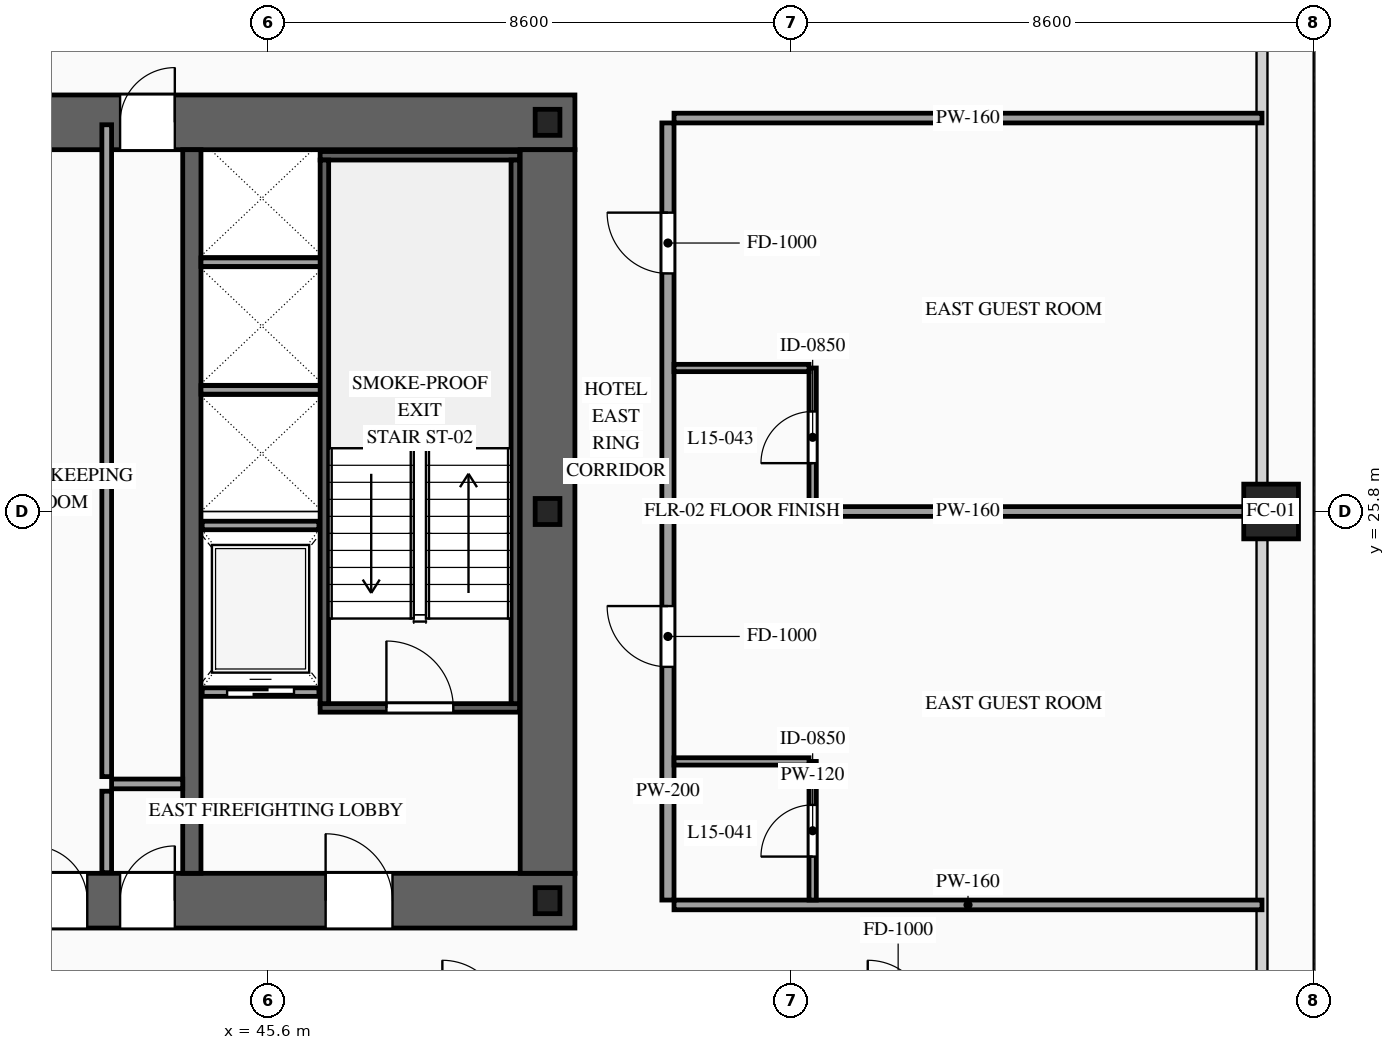
"""IFC4 building model, lengths in metres.
Left out: names, types, materials, properties, quantities, classifications, styles, units other than length and angle.
Written with IfcOpenShell. Run it as: python <this file> out.ifc"""

import sys

from ifc_helpers import new_model, si_unit, direction, frame, frame_2d, origin, origin_2d, place, context, subcontext, project, spatial, rectangle, hollow_rectangle, i_section, extrude, source, transform, mapped, element, fill, save


model = new_model("IFC4")
c1 = context("Model", 3, precision=1e-05, world=origin(), true_north=direction((0.0, 1.0)))
c2 = subcontext(c1, "Body", "Model", "MODEL_VIEW")
j1 = project(units=[si_unit("LENGTHUNIT", "METRE"), si_unit("PLANEANGLEUNIT", "RADIAN")], contexts=[c1])
p1 = place(None, origin())
s1 = spatial("IfcSite", under=j1, at=p1, CompositionType="ELEMENT")
p2 = place(p1, origin())
s2 = spatial("IfcBuilding", under=s1, at=p2, CompositionType="ELEMENT")
p3 = place(p2, frame((0.0, 0.0, 60.4)))
s3 = spatial("IfcBuildingStorey", under=s2, at=p3, CompositionType="ELEMENT", Elevation=60.4)
p4 = place(p3, frame((23.35, 19.4, 0.0), z_axis=(0.0, 0.0, 1.0), x_axis=(1.0, 0.0, 0.0)))
e1 = element("IfcWall", 1, at=p4, inside=s3, PredefinedType="SHEAR", context=c2, shape_type="SweptSolid", body=[
    extrude(rectangle(XDim=27.3, YDim=0.9, at=frame_2d((13.65, 0.0))), origin(), (0.0, 0.0, 1.0), 3.6),
])
p5 = place(p4, frame((2.1, 0.0, 0.0)))
e2 = element("IfcOpeningElement", 2, at=p5, cuts=e1, PredefinedType="OPENING", context=c2, shape_type="SweptSolid", body=[
    extrude(rectangle(XDim=1.1, YDim=2.2, at=frame_2d((0.55, 1.1))), frame((0.0, 0.465, 0.0), z_axis=(0.0, -1.0, 0.0), x_axis=(1.0, 0.0, 0.0)), (0.0, 0.0, 1.0), 0.93),
])
p6 = place(p4, frame((10.0, 0.0, 0.0)))
e3 = element("IfcOpeningElement", 3, at=p6, cuts=e1, PredefinedType="OPENING", context=c2, shape_type="SweptSolid", body=[
    extrude(rectangle(XDim=1.1, YDim=2.2, at=frame_2d((0.55, 1.1))), frame((0.0, 0.465, 0.0), z_axis=(0.0, -1.0, 0.0), x_axis=(1.0, 0.0, 0.0)), (0.0, 0.0, 1.0), 0.93),
])
p7 = place(p4, frame((23.2, 0.0, 0.0)))
e4 = element("IfcOpeningElement", 4, at=p7, cuts=e1, PredefinedType="OPENING", context=c2, shape_type="SweptSolid", body=[
    extrude(rectangle(XDim=1.1, YDim=2.2, at=frame_2d((0.55, 1.1))), frame((0.0, 0.465, 0.0), z_axis=(0.0, -1.0, 0.0), x_axis=(1.0, 0.0, 0.0)), (0.0, 0.0, 1.0), 0.93),
])
p8 = place(p4, frame((19.82, 0.0, 0.0)))
e5 = element("IfcOpeningElement", 5, at=p8, cuts=e1, PredefinedType="OPENING", context=c2, shape_type="SweptSolid", body=[
    extrude(rectangle(XDim=0.9, YDim=2.15, at=frame_2d((0.45, 1.075))), frame((0.0, 0.465, 0.0), z_axis=(0.0, -1.0, 0.0), x_axis=(1.0, 0.0, 0.0)), (0.0, 0.0, 1.0), 0.93),
])
p9 = place(p4, frame((18.38, 0.0, 0.0)))
e6 = element("IfcOpeningElement", 6, at=p9, cuts=e1, PredefinedType="OPENING", context=c2, shape_type="SweptSolid", body=[
    extrude(rectangle(XDim=0.9, YDim=2.15, at=frame_2d((0.45, 1.075))), frame((0.0, 0.465, 0.0), z_axis=(0.0, -1.0, 0.0), x_axis=(1.0, 0.0, 0.0)), (0.0, 0.0, 1.0), 0.93),
])
p10 = place(p3, frame((23.35, 32.2, 0.0), z_axis=(0.0, 0.0, 1.0), x_axis=(1.0, 0.0, 0.0)))
e7 = element("IfcWall", 7, at=p10, inside=s3, PredefinedType="SHEAR", context=c2, shape_type="SweptSolid", body=[
    extrude(rectangle(XDim=27.3, YDim=0.9, at=frame_2d((13.65, 0.0))), origin(), (0.0, 0.0, 1.0), 3.6),
])
p11 = place(p10, frame((4.72, 0.0, 0.0)))
e8 = element("IfcOpeningElement", 8, at=p11, cuts=e7, PredefinedType="OPENING", context=c2, shape_type="SweptSolid", body=[
    extrude(rectangle(XDim=0.9, YDim=2.15, at=frame_2d((0.45, 1.075))), frame((0.0, 0.465, 0.0), z_axis=(0.0, -1.0, 0.0), x_axis=(1.0, 0.0, 0.0)), (0.0, 0.0, 1.0), 0.93),
])
p12 = place(p10, frame((10.0, 0.0, 0.0)))
e9 = element("IfcOpeningElement", 9, at=p12, cuts=e7, PredefinedType="OPENING", context=c2, shape_type="SweptSolid", body=[
    extrude(rectangle(XDim=1.1, YDim=2.2, at=frame_2d((0.55, 1.1))), frame((0.0, 0.465, 0.0), z_axis=(0.0, -1.0, 0.0), x_axis=(1.0, 0.0, 0.0)), (0.0, 0.0, 1.0), 0.93),
])
p13 = place(p10, frame((15.85, 0.0, 0.0)))
e10 = element("IfcOpeningElement", 10, at=p13, cuts=e7, PredefinedType="OPENING", context=c2, shape_type="SweptSolid", body=[
    extrude(rectangle(XDim=1.1, YDim=2.2, at=frame_2d((0.55, 1.1))), frame((0.0, 0.465, 0.0), z_axis=(0.0, -1.0, 0.0), x_axis=(1.0, 0.0, 0.0)), (0.0, 0.0, 1.0), 0.93),
])
p14 = place(p10, frame((19.82, 0.0, 0.0)))
e11 = element("IfcOpeningElement", 11, at=p14, cuts=e7, PredefinedType="OPENING", context=c2, shape_type="SweptSolid", body=[
    extrude(rectangle(XDim=0.9, YDim=2.15, at=frame_2d((0.45, 1.075))), frame((0.0, 0.465, 0.0), z_axis=(0.0, -1.0, 0.0), x_axis=(1.0, 0.0, 0.0)), (0.0, 0.0, 1.0), 0.93),
])
m1 = source(origin(), c2, "Body", "SweptSolid", [
    extrude(rectangle(XDim=11.9, YDim=0.9, at=frame_2d((5.95, 0.0))), origin(), (0.0, 0.0, 1.0), 3.6),
])
p15 = place(p3, frame((50.2, 19.85, 0.0), z_axis=(0.0, 0.0, 1.0), x_axis=(0.0, 1.0, 0.0)))
e12 = element("IfcWall", 12, at=p15, inside=s3, PredefinedType="SHEAR", context=c2, shape_type="MappedRepresentation", body=[
    mapped(m1, transform((0.0, 0.0, 0.0), scale=1.0)),
])
m2 = source(origin(), c2, "Body", "SweptSolid", [
    extrude(rectangle(XDim=11.9, YDim=0.3, at=frame_2d((5.95, 0.0))), origin(), (0.0, 0.0, 1.0), 3.6),
])
p16 = place(p3, frame((44.35, 19.85, 0.0), z_axis=(0.0, 0.0, 1.0), x_axis=(0.0, 1.0, 0.0)))
e13 = element("IfcWall", 13, at=p16, inside=s3, PredefinedType="SOLIDWALL", context=c2, shape_type="MappedRepresentation", body=[
    mapped(m2, transform((0.0, 0.0, 0.0), scale=1.0)),
])
m3 = source(origin(), c2, "Body", "SweptSolid", [
    extrude(i_section(OverallWidth=0.407, OverallDepth=0.428, WebThickness=0.02, FlangeThickness=0.035, at=origin_2d()), origin(), (0.0, 0.0, 1.0), 3.6),
])
for number, where, z_axis, x_axis in (
    (14, (50.2, 19.4, 0.0), (0.0, 0.0, 1.0), (1.0, 0.0, 0.0)),
    (15, (50.2, 25.8, 0.0), (0.0, 0.0, 1.0), (1.0, 0.0, 0.0)),
    (16, (50.2, 32.2, 0.0), (0.0, 0.0, 1.0), (1.0, 0.0, 0.0)),
):
    element("IfcColumn", number, at=place(p3, frame(where, z_axis=z_axis, x_axis=x_axis)), inside=s3, PredefinedType="COLUMN", context=c2, shape_type="MappedRepresentation", body=[
        mapped(m3, transform((0.0, 0.0, 0.0), scale=1.0)),
    ])
m4 = source(origin(), c2, "Body", "SweptSolid", [
    extrude(hollow_rectangle(XDim=0.9, YDim=0.9, WallThickness=0.042, at=origin_2d()), origin(), (0.0, 0.0, 1.0), 3.6),
])
p17 = place(p3, frame((62.1, 25.8, 0.0), z_axis=(0.0, 0.0, 1.0), x_axis=(1.0, 0.0, 0.0)))
e17 = element("IfcColumn", 17, at=p17, inside=s3, PredefinedType="COLUMN", context=c2, shape_type="MappedRepresentation", body=[
    mapped(m4, transform((0.0, 0.0, 0.0), scale=1.0)),
])
p18 = place(p3, frame((44.52, 22.83, 0.0), z_axis=(0.0, 0.0, 1.0), x_axis=(1.0, 0.0, 0.0)))
e18 = element("IfcWall", 18, at=p18, inside=s3, PredefinedType="SOLIDWALL", context=c2, shape_type="SweptSolid", body=[
    extrude(rectangle(XDim=1.92, YDim=0.14, at=frame_2d((0.96, 0.0))), origin(), (0.0, 0.0, 1.0), 3.38),
])
p19 = place(p18, frame((0.41, 0.0, 0.0)))
e19 = element("IfcOpeningElement", 19, at=p19, cuts=e18, PredefinedType="OPENING", context=c2, shape_type="SweptSolid", body=[
    extrude(rectangle(XDim=1.1, YDim=2.2, at=frame_2d((0.55, 1.1))), frame((0.0, 0.085, 0.0), z_axis=(0.0, -1.0, 0.0), x_axis=(1.0, 0.0, 0.0)), (0.0, 0.0, 1.0), 0.17),
])
m5 = source(origin(), c2, "Body", "SweptSolid", [
    extrude(rectangle(XDim=1.92, YDim=0.14, at=frame_2d((0.96, 0.0))), origin(), (0.0, 0.0, 1.0), 3.38),
])
p20 = place(p3, frame((44.52, 25.57, 0.0), z_axis=(0.0, 0.0, 1.0), x_axis=(1.0, 0.0, 0.0)))
e20 = element("IfcWall", 20, at=p20, inside=s3, PredefinedType="SOLIDWALL", context=c2, shape_type="MappedRepresentation", body=[
    mapped(m5, transform((0.0, 0.0, 0.0), scale=1.0)),
])
m6 = source(origin(), c2, "Body", "SweptSolid", [
    extrude(rectangle(XDim=2.0, YDim=0.14, at=frame_2d((1.0, 0.0))), origin(), (0.0, 0.0, 1.0), 3.38),
])
for number, where, z_axis, x_axis in (
    (21, (44.5, 27.8, 0.0), (0.0, 0.0, 1.0), (1.0, 0.0, 0.0)),
    (22, (44.5, 29.9, 0.0), (0.0, 0.0, 1.0), (1.0, 0.0, 0.0)),
):
    element("IfcWall", number, at=place(p3, frame(where, z_axis=z_axis, x_axis=x_axis)), inside=s3, PredefinedType="SOLIDWALL", context=c2, shape_type="MappedRepresentation", body=[
        mapped(m6, transform((0.0, 0.0, 0.0), scale=1.0)),
    ])
p21 = place(p3, frame((46.46, 22.57, 0.0), z_axis=(0.0, 0.0, 1.0), x_axis=(1.0, 0.0, 0.0)))
e23 = element("IfcWall", 23, at=p21, inside=s3, PredefinedType="SOLIDWALL", context=c2, shape_type="SweptSolid", body=[
    extrude(rectangle(XDim=3.28, YDim=0.14, at=frame_2d((1.64, 0.0))), origin(), (0.0, 0.0, 1.0), 3.38),
])
p22 = place(p21, frame((1.09, 0.0, 0.0)))
e24 = element("IfcOpeningElement", 24, at=p22, cuts=e23, PredefinedType="OPENING", context=c2, shape_type="SweptSolid", body=[
    extrude(rectangle(XDim=1.1, YDim=2.2, at=frame_2d((0.55, 1.1))), frame((0.0, 0.085, 0.0), z_axis=(0.0, -1.0, 0.0), x_axis=(1.0, 0.0, 0.0)), (0.0, 0.0, 1.0), 0.17),
])
m7 = source(origin(), c2, "Body", "SweptSolid", [
    extrude(rectangle(XDim=3.28, YDim=0.14, at=frame_2d((1.64, 0.0))), origin(), (0.0, 0.0, 1.0), 3.38),
])
p23 = place(p3, frame((46.46, 31.65, 0.0), z_axis=(0.0, 0.0, 1.0), x_axis=(1.0, 0.0, 0.0)))
e25 = element("IfcWall", 25, at=p23, inside=s3, PredefinedType="SOLIDWALL", context=c2, shape_type="MappedRepresentation", body=[
    mapped(m7, transform((0.0, 0.0, 0.0), scale=1.0)),
])
m8 = source(origin(), c2, "Body", "SweptSolid", [
    extrude(rectangle(XDim=8.94, YDim=0.14, at=frame_2d((4.47, 0.0))), origin(), (0.0, 0.0, 1.0), 3.38),
])
for number, where, z_axis, x_axis in (
    (26, (46.53, 22.64, 0.0), (0.0, 0.0, 1.0), (0.0, 1.0, 0.0)),
    (27, (49.67, 22.64, 0.0), (0.0, 0.0, 1.0), (0.0, 1.0, 0.0)),
):
    element("IfcWall", number, at=place(p3, frame(where, z_axis=z_axis, x_axis=x_axis)), inside=s3, PredefinedType="SOLIDWALL", context=c2, shape_type="MappedRepresentation", body=[
        mapped(m8, transform((0.0, 0.0, 0.0), scale=1.0)),
    ])
m9 = source(origin(), c2, "Body", "SweptSolid", [
    extrude(rectangle(XDim=1.34, YDim=0.16, at=frame_2d((0.67, 0.0))), origin(), (0.0, 0.0, 1.0), 3.38),
])
p24 = place(p3, frame((42.95, 19.86, 0.0), z_axis=(0.0, 0.0, 1.0), x_axis=(0.0, 1.0, 0.0)))
e28 = element("IfcWall", 28, at=p24, inside=s3, PredefinedType="PARTITIONING", context=c2, shape_type="MappedRepresentation", body=[
    mapped(m9, transform((0.0, 0.0, 0.0), scale=1.0)),
])
m10 = source(origin(), c2, "Body", "SweptSolid", [
    extrude(rectangle(XDim=1.17, YDim=0.16, at=frame_2d((0.585, 0.0))), origin(), (0.0, 0.0, 1.0), 3.38),
])
p25 = place(p3, frame((43.03, 21.32, 0.0), z_axis=(0.0, 0.0, 1.0), x_axis=(1.0, 0.0, 0.0)))
e29 = element("IfcWall", 29, at=p25, inside=s3, PredefinedType="PARTITIONING", context=c2, shape_type="MappedRepresentation", body=[
    mapped(m10, transform((0.0, 0.0, 0.0), scale=1.0)),
])
m11 = source(origin(), c2, "Body", "SweptSolid", [
    extrude(rectangle(XDim=10.72, YDim=0.16, at=frame_2d((5.36, 0.0))), origin(), (0.0, 0.0, 1.0), 3.38),
])
p26 = place(p3, frame((42.95, 21.44, 0.0), z_axis=(0.0, 0.0, 1.0), x_axis=(0.0, 1.0, 0.0)))
e30 = element("IfcWall", 30, at=p26, inside=s3, PredefinedType="PARTITIONING", context=c2, shape_type="MappedRepresentation", body=[
    mapped(m11, transform((0.0, 0.0, 0.0), scale=1.0)),
])
p27 = place(p3, frame((52.18, 19.41, 0.0), z_axis=(0.0, 0.0, 1.0), x_axis=(0.0, 1.0, 0.0)))
e31 = element("IfcWall", 31, at=p27, inside=s3, PredefinedType="PARTITIONING", context=c2, shape_type="SweptSolid", body=[
    extrude(rectangle(XDim=6.31, YDim=0.2, at=frame_2d((3.155, 0.0))), origin(), (0.0, 0.0, 1.0), 3.38),
])
p28 = place(p27, frame((3.835, 0.0, 0.0)))
e32 = element("IfcOpeningElement", 32, at=p28, cuts=e31, PredefinedType="OPENING", context=c2, shape_type="SweptSolid", body=[
    extrude(rectangle(XDim=1.0, YDim=2.2, at=frame_2d((0.5, 1.1))), frame((0.0, 0.115, 0.0), z_axis=(0.0, -1.0, 0.0), x_axis=(1.0, 0.0, 0.0)), (0.0, 0.0, 1.0), 0.23),
])
m12 = source(origin(), c2, "Body", "SweptSolid", [
    extrude(rectangle(XDim=9.67, YDim=0.16, at=frame_2d((4.835, 0.0))), origin(), (0.0, 0.0, 1.0), 2.575),
])
p29 = place(p3, frame((52.28, 25.8, 0.0), z_axis=(0.0, 0.0, 1.0), x_axis=(1.0, 0.0, 0.0)))
e33 = element("IfcWall", 33, at=p29, inside=s3, PredefinedType="PARTITIONING", context=c2, shape_type="MappedRepresentation", body=[
    mapped(m12, transform((0.0, 0.0, 0.0), scale=1.0)),
])
m13 = source(origin(), c2, "Body", "SweptSolid", [
    extrude(rectangle(XDim=9.67, YDim=0.16, at=frame_2d((4.835, 0.0))), origin(), (0.0, 0.0, 1.0), 2.875),
])
p30 = place(p3, frame((52.28, 19.33, 0.0), z_axis=(0.0, 0.0, 1.0), x_axis=(1.0, 0.0, 0.0)))
e34 = element("IfcWall", 34, at=p30, inside=s3, PredefinedType="PARTITIONING", context=c2, shape_type="MappedRepresentation", body=[
    mapped(m13, transform((0.0, 0.0, 0.0), scale=1.0)),
])
p31 = place(p3, frame((54.56, 19.41, 0.0), z_axis=(0.0, 0.0, 1.0), x_axis=(0.0, 1.0, 0.0)))
e35 = element("IfcWall", 35, at=p31, inside=s3, PredefinedType="PARTITIONING", context=c2, shape_type="SweptSolid", body=[
    extrude(rectangle(XDim=2.28, YDim=0.12, at=frame_2d((1.14, 0.0))), origin(), (0.0, 0.0, 1.0), 3.38),
])
p32 = place(p31, frame((0.715, 0.0, 0.0)))
e36 = element("IfcOpeningElement", 36, at=p32, cuts=e35, PredefinedType="OPENING", context=c2, shape_type="SweptSolid", body=[
    extrude(rectangle(XDim=0.85, YDim=2.1, at=frame_2d((0.425, 1.05))), frame((0.0, 0.075, 0.0), z_axis=(0.0, -1.0, 0.0), x_axis=(1.0, 0.0, 0.0)), (0.0, 0.0, 1.0), 0.15),
])
m14 = source(origin(), c2, "Body", "SweptSolid", [
    extrude(rectangle(XDim=2.22, YDim=0.12, at=frame_2d((1.11, 0.0))), origin(), (0.0, 0.0, 1.0), 3.38),
])
p33 = place(p3, frame((52.28, 21.69, 0.0), z_axis=(0.0, 0.0, 1.0), x_axis=(1.0, 0.0, 0.0)))
e37 = element("IfcWall", 37, at=p33, inside=s3, PredefinedType="PARTITIONING", context=c2, shape_type="MappedRepresentation", body=[
    mapped(m14, transform((0.0, 0.0, 0.0), scale=1.0)),
])
p34 = place(p3, frame((52.18, 25.88, 0.0), z_axis=(0.0, 0.0, 1.0), x_axis=(0.0, 1.0, 0.0)))
e38 = element("IfcWall", 38, at=p34, inside=s3, PredefinedType="PARTITIONING", context=c2, shape_type="SweptSolid", body=[
    extrude(rectangle(XDim=6.31, YDim=0.2, at=frame_2d((3.155, 0.0))), origin(), (0.0, 0.0, 1.0), 3.38),
])
p35 = place(p34, frame((3.835, 0.0, 0.0)))
e39 = element("IfcOpeningElement", 39, at=p35, cuts=e38, PredefinedType="OPENING", context=c2, shape_type="SweptSolid", body=[
    extrude(rectangle(XDim=1.0, YDim=2.2, at=frame_2d((0.5, 1.1))), frame((0.0, 0.115, 0.0), z_axis=(0.0, -1.0, 0.0), x_axis=(1.0, 0.0, 0.0)), (0.0, 0.0, 1.0), 0.23),
])
p36 = place(p3, frame((52.28, 32.27, 0.0), z_axis=(0.0, 0.0, 1.0), x_axis=(1.0, 0.0, 0.0)))
e40 = element("IfcWall", 40, at=p36, inside=s3, PredefinedType="PARTITIONING", context=c2, shape_type="MappedRepresentation", body=[
    mapped(m13, transform((0.0, 0.0, 0.0), scale=1.0)),
])
p37 = place(p3, frame((54.56, 25.88, 0.0), z_axis=(0.0, 0.0, 1.0), x_axis=(0.0, 1.0, 0.0)))
e41 = element("IfcWall", 41, at=p37, inside=s3, PredefinedType="PARTITIONING", context=c2, shape_type="SweptSolid", body=[
    extrude(rectangle(XDim=2.28, YDim=0.12, at=frame_2d((1.14, 0.0))), origin(), (0.0, 0.0, 1.0), 3.38),
])
p38 = place(p37, frame((0.715, 0.0, 0.0)))
e42 = element("IfcOpeningElement", 42, at=p38, cuts=e41, PredefinedType="OPENING", context=c2, shape_type="SweptSolid", body=[
    extrude(rectangle(XDim=0.85, YDim=2.1, at=frame_2d((0.425, 1.05))), frame((0.0, 0.075, 0.0), z_axis=(0.0, -1.0, 0.0), x_axis=(1.0, 0.0, 0.0)), (0.0, 0.0, 1.0), 0.15),
])
p39 = place(p3, frame((52.28, 28.16, 0.0), z_axis=(0.0, 0.0, 1.0), x_axis=(1.0, 0.0, 0.0)))
e43 = element("IfcWall", 43, at=p39, inside=s3, PredefinedType="PARTITIONING", context=c2, shape_type="MappedRepresentation", body=[
    mapped(m14, transform((0.0, 0.0, 0.0), scale=1.0)),
])
m15 = source(origin(), c2, "Body", "SweptSolid", [
    extrude(rectangle(XDim=1.1, YDim=2.2, at=frame_2d((0.55, 1.1))), frame((0.0, 0.025, 0.0), z_axis=(0.0, -1.0, 0.0), x_axis=(1.0, 0.0, 0.0)), (0.0, 0.0, 1.0), 0.05),
])
p40 = place(p19, origin())
e44 = element("IfcDoor", 44, at=p40, inside=s3, OperationType="SLIDING_TO_RIGHT", PredefinedType="DOOR", context=c2, shape_type="MappedRepresentation", body=[
    mapped(m15, transform((0.0, 0.0, 0.0), scale=1.0)),
])
fill(e19, e44)
m16 = source(origin(), c2, "Body", "SweptSolid", [
    extrude(rectangle(XDim=1.1, YDim=2.2, at=frame_2d((0.55, 1.1))), frame((0.0, 0.025, 0.0), z_axis=(0.0, -1.0, 0.0), x_axis=(1.0, 0.0, 0.0)), (0.0, 0.0, 1.0), 0.05),
])
p41 = place(p22, origin())
e45 = element("IfcDoor", 45, at=p41, inside=s3, OperationType="SINGLE_SWING_LEFT", PredefinedType="DOOR", context=c2, shape_type="MappedRepresentation", body=[
    mapped(m16, transform((0.0, 0.0, 0.0), scale=1.0)),
])
fill(e24, e45)
p42 = place(p7, origin())
e46 = element("IfcDoor", 46, at=p42, inside=s3, OperationType="SINGLE_SWING_LEFT", PredefinedType="DOOR", context=c2, shape_type="MappedRepresentation", body=[
    mapped(m16, transform((0.0, 0.0, 0.0), scale=1.0)),
])
fill(e4, e46)
m17 = source(origin(), c2, "Body", "SweptSolid", [
    extrude(rectangle(XDim=0.9, YDim=2.15, at=frame_2d((0.45, 1.075))), frame((0.0, 0.025, 0.0), z_axis=(0.0, -1.0, 0.0), x_axis=(1.0, 0.0, 0.0)), (0.0, 0.0, 1.0), 0.05),
])
p43 = place(p8, origin())
e47 = element("IfcDoor", 47, at=p43, inside=s3, OperationType="SINGLE_SWING_RIGHT", PredefinedType="DOOR", context=c2, shape_type="MappedRepresentation", body=[
    mapped(m17, transform((0.0, 0.0, 0.0), scale=1.0)),
])
fill(e5, e47)
p44 = place(p9, origin())
e48 = element("IfcDoor", 48, at=p44, inside=s3, OperationType="SINGLE_SWING_LEFT", PredefinedType="DOOR", context=c2, shape_type="MappedRepresentation", body=[
    mapped(m17, transform((0.0, 0.0, 0.0), scale=1.0)),
])
fill(e6, e48)
p45 = place(p14, origin())
e49 = element("IfcDoor", 49, at=p45, inside=s3, OperationType="SINGLE_SWING_RIGHT", PredefinedType="DOOR", context=c2, shape_type="MappedRepresentation", body=[
    mapped(m17, transform((0.0, 0.0, 0.0), scale=1.0)),
])
fill(e11, e49)
m18 = source(origin(), c2, "Body", "SweptSolid", [
    extrude(rectangle(XDim=1.0, YDim=2.2, at=frame_2d((0.5, 1.1))), frame((0.0, 0.025, 0.0), z_axis=(0.0, -1.0, 0.0), x_axis=(1.0, 0.0, 0.0)), (0.0, 0.0, 1.0), 0.05),
])
p46 = place(p28, origin())
e50 = element("IfcDoor", 50, at=p46, inside=s3, OperationType="SINGLE_SWING_RIGHT", PredefinedType="DOOR", context=c2, shape_type="MappedRepresentation", body=[
    mapped(m18, transform((0.0, 0.0, 0.0), scale=1.0)),
])
fill(e32, e50)
m19 = source(origin(), c2, "Body", "SweptSolid", [
    extrude(rectangle(XDim=0.85, YDim=2.1, at=frame_2d((0.425, 1.05))), frame((0.0, 0.025, 0.0), z_axis=(0.0, -1.0, 0.0), x_axis=(1.0, 0.0, 0.0)), (0.0, 0.0, 1.0), 0.05),
])
p47 = place(p32, origin())
e51 = element("IfcDoor", 51, at=p47, inside=s3, OperationType="SINGLE_SWING_LEFT", PredefinedType="DOOR", context=c2, shape_type="MappedRepresentation", body=[
    mapped(m19, transform((0.0, 0.0, 0.0), scale=1.0)),
])
fill(e36, e51)
p48 = place(p35, origin())
e52 = element("IfcDoor", 52, at=p48, inside=s3, OperationType="SINGLE_SWING_RIGHT", PredefinedType="DOOR", context=c2, shape_type="MappedRepresentation", body=[
    mapped(m18, transform((0.0, 0.0, 0.0), scale=1.0)),
])
fill(e39, e52)
p49 = place(p38, origin())
e53 = element("IfcDoor", 53, at=p49, inside=s3, OperationType="SINGLE_SWING_LEFT", PredefinedType="DOOR", context=c2, shape_type="MappedRepresentation", body=[
    mapped(m19, transform((0.0, 0.0, 0.0), scale=1.0)),
])
fill(e42, e53)
save(model, sys.argv[1])
